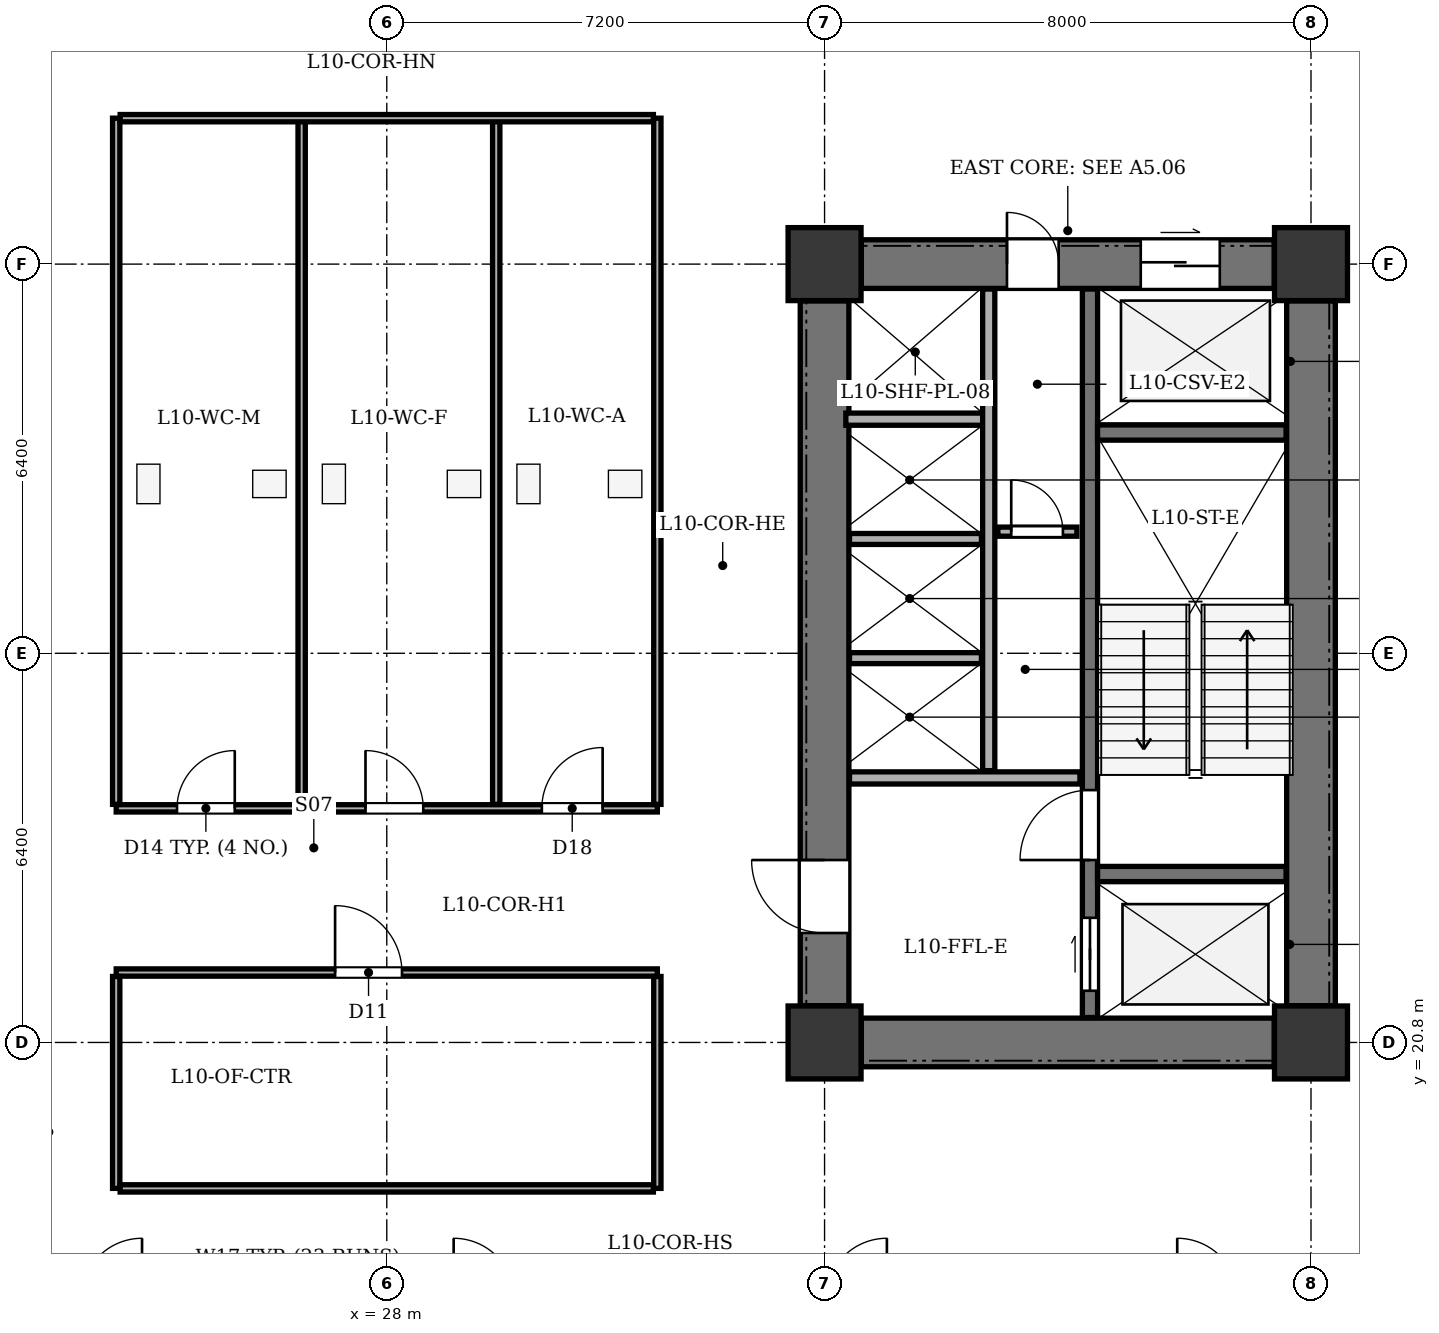
"""IFC4 building model, lengths in metres.
Left out: names, types, materials, properties, quantities, classifications, styles, units other than length and angle.
Written with IfcOpenShell. Run it as: python <this file> out.ifc"""

import sys

from ifc_helpers import new_model, si_unit, direction, frame, frame_2d, origin, origin_2d, place, context, subcontext, project, spatial, rectangle, extrude, element, fill, save


model = new_model("IFC4")
c1 = context("Model", 3, precision=1e-05, world=origin(), true_north=direction((0.0, 1.0)))
c2 = subcontext(c1, "Body", "Model", "MODEL_VIEW")
j1 = project(units=[si_unit("LENGTHUNIT", "METRE"), si_unit("PLANEANGLEUNIT", "RADIAN")], contexts=[c1])
p1 = place(None, origin())
s1 = spatial("IfcSite", under=j1, at=p1, CompositionType="ELEMENT")
p2 = place(p1, origin())
s2 = spatial("IfcBuilding", under=s1, at=p2, CompositionType="ELEMENT")
p3 = place(p2, frame((0.0, 0.0, 43.8)))
s3 = spatial("IfcBuildingStorey", under=s2, at=p3, CompositionType="ELEMENT", Elevation=43.8)
for number, where, z_axis, x_axis in (
    (1, (35.2, 20.8, 0.0), (0.0, 0.0, 1.0), (1.0, 0.0, 0.0)),
    (2, (43.2, 20.8, 0.0), (0.0, 0.0, 1.0), (1.0, 0.0, 0.0)),
    (3, (35.2, 33.6, 0.0), (0.0, 0.0, 1.0), (1.0, 0.0, 0.0)),
    (4, (43.2, 33.6, 0.0), (0.0, 0.0, 1.0), (1.0, 0.0, 0.0)),
):
    element("IfcColumn", number, at=place(p3, frame(where, z_axis=z_axis, x_axis=x_axis)), inside=s3, PredefinedType="COLUMN", context=c2, shape_type="SweptSolid", body=[
        extrude(rectangle(XDim=1.2, YDim=1.2, at=origin_2d()), origin(), (0.0, 0.0, 1.0), 3.9),
    ])
p4 = place(p3, frame((43.2, 21.405, 0.0), z_axis=(0.0, 0.0, 1.0), x_axis=(0.0, 1.0, 0.0)))
e5 = element("IfcWall", 5, at=p4, inside=s3, PredefinedType="SHEAR", context=c2, shape_type="SweptSolid", body=[
    extrude(rectangle(XDim=11.59, YDim=0.8, at=frame_2d((5.795, 0.0))), origin(), (0.0, 0.0, 1.0), 3.45),
])
p5 = place(p3, frame((35.805, 20.8, 0.0), z_axis=(0.0, 0.0, 1.0), x_axis=(1.0, 0.0, 0.0)))
e6 = element("IfcWall", 6, at=p5, inside=s3, PredefinedType="SHEAR", context=c2, shape_type="SweptSolid", body=[
    extrude(rectangle(XDim=6.79, YDim=0.8, at=frame_2d((3.395, 0.0))), origin(), (0.0, 0.0, 1.0), 3.45),
])
p6 = place(p3, frame((35.805, 33.6, 0.0), z_axis=(0.0, 0.0, 1.0), x_axis=(1.0, 0.0, 0.0)))
e7 = element("IfcWall", 7, at=p6, inside=s3, PredefinedType="SHEAR", context=c2, shape_type="SweptSolid", body=[
    extrude(rectangle(XDim=6.79, YDim=0.8, at=frame_2d((3.395, 0.0))), origin(), (0.0, 0.0, 1.0), 3.45),
])
p7 = place(p6, frame((4.595, 0.0, 0.0)))
e8 = element("IfcOpeningElement", 8, at=p7, cuts=e7, PredefinedType="OPENING", context=c2, shape_type="SweptSolid", body=[
    extrude(rectangle(XDim=1.3, YDim=2.15, at=frame_2d((0.65, 1.075))), frame((0.0, 0.41, 0.0), z_axis=(0.0, -1.0, 0.0), x_axis=(1.0, 0.0, 0.0)), (0.0, 0.0, 1.0), 0.82),
])
p8 = place(p6, frame((2.395, 0.0, 0.0)))
e9 = element("IfcOpeningElement", 9, at=p8, cuts=e7, PredefinedType="OPENING", context=c2, shape_type="SweptSolid", body=[
    extrude(rectangle(XDim=0.85, YDim=2.02, at=frame_2d((0.425, 1.01))), frame((0.0, 0.41, 0.0), z_axis=(0.0, -1.0, 0.0), x_axis=(1.0, 0.0, 0.0)), (0.0, 0.0, 1.0), 0.82),
])
p9 = place(p3, frame((35.2, 21.405, 0.0), z_axis=(0.0, 0.0, 1.0), x_axis=(0.0, 1.0, 0.0)))
e10 = element("IfcWall", 10, at=p9, inside=s3, PredefinedType="SHEAR", context=c2, shape_type="SweptSolid", body=[
    extrude(rectangle(XDim=11.59, YDim=0.8, at=frame_2d((5.795, 0.0))), origin(), (0.0, 0.0, 1.0), 3.45),
])
p10 = place(p9, frame((1.195, 0.0, 0.0)))
e11 = element("IfcOpeningElement", 11, at=p10, cuts=e10, PredefinedType="OPENING", context=c2, shape_type="SweptSolid", body=[
    extrude(rectangle(XDim=1.2, YDim=2.15, at=frame_2d((0.6, 1.075))), frame((0.0, 0.41, 0.0), z_axis=(0.0, -1.0, 0.0), x_axis=(1.0, 0.0, 0.0)), (0.0, 0.0, 1.0), 0.82),
])
p11 = place(p3, frame((39.565, 21.21, 0.0), z_axis=(0.0, 0.0, 1.0), x_axis=(0.0, 1.0, 0.0)))
e12 = element("IfcWall", 12, at=p11, inside=s3, PredefinedType="SHEAR", context=c2, shape_type="SweptSolid", body=[
    extrude(rectangle(XDim=11.98, YDim=0.25, at=frame_2d((5.99, 0.0))), origin(), (0.0, 0.0, 1.0), 3.45),
])
p12 = place(p11, frame((0.44, 0.0, 0.0)))
e13 = element("IfcOpeningElement", 13, at=p12, cuts=e12, PredefinedType="OPENING", context=c2, shape_type="SweptSolid", body=[
    extrude(rectangle(XDim=1.2, YDim=2.15, at=frame_2d((0.6, 1.075))), frame((0.0, 0.135, 0.0), z_axis=(0.0, -1.0, 0.0), x_axis=(1.0, 0.0, 0.0)), (0.0, 0.0, 1.0), 0.27),
])
p13 = place(p11, frame((2.59, 0.0, 0.0)))
e14 = element("IfcOpeningElement", 14, at=p13, cuts=e12, PredefinedType="OPENING", context=c2, shape_type="SweptSolid", body=[
    extrude(rectangle(XDim=1.15, YDim=2.15, at=frame_2d((0.575, 1.075))), frame((0.0, 0.135, 0.0), z_axis=(0.0, -1.0, 0.0), x_axis=(1.0, 0.0, 0.0)), (0.0, 0.0, 1.0), 0.27),
])
for number, where, z_axis, x_axis in (
    (15, (39.69, 23.57, 0.0), (0.0, 0.0, 1.0), (1.0, 0.0, 0.0)),
    (16, (39.69, 30.83, 0.0), (0.0, 0.0, 1.0), (1.0, 0.0, 0.0)),
):
    element("IfcWall", number, at=place(p3, frame(where, z_axis=z_axis, x_axis=x_axis)), inside=s3, PredefinedType="SHEAR", context=c2, shape_type="SweptSolid", body=[
        extrude(rectangle(XDim=3.1, YDim=0.25, at=frame_2d((1.55, 0.0))), origin(), (0.0, 0.0, 1.0), 3.45),
    ])
p14 = place(p3, frame((35.61, 25.15, 0.0), z_axis=(0.0, 0.0, 1.0), x_axis=(1.0, 0.0, 0.0)))
e17 = element("IfcWall", 17, at=p14, inside=s3, PredefinedType="SOLIDWALL", context=c2, shape_type="SweptSolid", body=[
    extrude(rectangle(XDim=3.79, YDim=0.2, at=frame_2d((1.895, 0.0))), origin(), (0.0, 0.0, 1.0), 3.45),
])
p15 = place(p3, frame((35.55, 31.05, 0.0), z_axis=(0.0, 0.0, 1.0), x_axis=(1.0, 0.0, 0.0)))
e18 = element("IfcWall", 18, at=p15, inside=s3, PredefinedType="SOLIDWALL", context=c2, shape_type="SweptSolid", body=[
    extrude(rectangle(XDim=2.25, YDim=0.2, at=frame_2d((1.125, 0.0))), origin(), (0.0, 0.0, 1.0), 3.45),
])
p16 = place(p3, frame((37.9, 25.27, 0.0), z_axis=(0.0, 0.0, 1.0), x_axis=(0.0, 1.0, 0.0)))
e19 = element("IfcWall", 19, at=p16, inside=s3, PredefinedType="SOLIDWALL", context=c2, shape_type="SweptSolid", body=[
    extrude(rectangle(XDim=7.92, YDim=0.2, at=frame_2d((3.96, 0.0))), origin(), (0.0, 0.0, 1.0), 3.45),
])
for number, where, z_axis, x_axis in (
    (20, (35.61, 27.12, 0.0), (0.0, 0.0, 1.0), (1.0, 0.0, 0.0)),
    (21, (35.61, 29.08, 0.0), (0.0, 0.0, 1.0), (1.0, 0.0, 0.0)),
):
    element("IfcWall", number, at=place(p3, frame(where, z_axis=z_axis, x_axis=x_axis)), inside=s3, PredefinedType="PARTITIONING", context=c2, shape_type="SweptSolid", body=[
        extrude(rectangle(XDim=2.17, YDim=0.18, at=frame_2d((1.085, 0.0))), origin(), (0.0, 0.0, 1.0), 3.45),
    ])
p17 = place(p3, frame((38.05, 29.2, 0.0), z_axis=(0.0, 0.0, 1.0), x_axis=(1.0, 0.0, 0.0)))
e22 = element("IfcWall", 22, at=p17, inside=s3, PredefinedType="PARTITIONING", context=c2, shape_type="SweptSolid", body=[
    extrude(rectangle(XDim=1.3, YDim=0.15, at=frame_2d((0.65, 0.0))), origin(), (0.0, 0.0, 1.0), 3.45),
])
p18 = place(p17, frame((0.22, 0.0, 0.0)))
e23 = element("IfcOpeningElement", 23, at=p18, cuts=e22, PredefinedType="OPENING", context=c2, shape_type="SweptSolid", body=[
    extrude(rectangle(XDim=0.85, YDim=2.02, at=frame_2d((0.425, 1.01))), frame((0.0, 0.085, 0.0), z_axis=(0.0, -1.0, 0.0), x_axis=(1.0, 0.0, 0.0)), (0.0, 0.0, 1.0), 0.17),
])
p19 = place(p3, frame((23.55, 24.65, 0.0), z_axis=(0.0, 0.0, 1.0), x_axis=(1.0, 0.0, 0.0)))
e24 = element("IfcWall", 24, at=p19, inside=s3, PredefinedType="PARTITIONING", context=c2, shape_type="SweptSolid", body=[
    extrude(rectangle(XDim=8.9, YDim=0.12, at=frame_2d((4.45, 0.0))), origin(), (0.0, 0.0, 1.0), 2.885),
])
p20 = place(p19, frame((1.0, 0.0, 0.0)))
e25 = element("IfcOpeningElement", 25, at=p20, cuts=e24, PredefinedType="OPENING", context=c2, shape_type="SweptSolid", body=[
    extrude(rectangle(XDim=0.95, YDim=2.1, at=frame_2d((0.475, 1.05))), frame((0.0, 0.07, 0.0), z_axis=(0.0, -1.0, 0.0), x_axis=(1.0, 0.0, 0.0)), (0.0, 0.0, 1.0), 0.14),
])
p21 = place(p19, frame((4.1, 0.0, 0.0)))
e26 = element("IfcOpeningElement", 26, at=p21, cuts=e24, PredefinedType="OPENING", context=c2, shape_type="SweptSolid", body=[
    extrude(rectangle(XDim=0.95, YDim=2.1, at=frame_2d((0.475, 1.05))), frame((0.0, 0.07, 0.0), z_axis=(0.0, -1.0, 0.0), x_axis=(1.0, 0.0, 0.0)), (0.0, 0.0, 1.0), 0.14),
])
p22 = place(p19, frame((7.0, 0.0, 0.0)))
e27 = element("IfcOpeningElement", 27, at=p22, cuts=e24, PredefinedType="OPENING", context=c2, shape_type="SweptSolid", body=[
    extrude(rectangle(XDim=1.0, YDim=2.1, at=frame_2d((0.5, 1.05))), frame((0.0, 0.07, 0.0), z_axis=(0.0, -1.0, 0.0), x_axis=(1.0, 0.0, 0.0)), (0.0, 0.0, 1.0), 0.14),
])
for number, where, z_axis, x_axis in (
    (28, (23.55, 24.715, 0.0), (0.0, 0.0, 1.0), (0.0, 1.0, 0.0)),
    (29, (32.45, 24.715, 0.0), (0.0, 0.0, 1.0), (0.0, 1.0, 0.0)),
    (30, (26.6, 24.715, 0.0), (0.0, 0.0, 1.0), (0.0, 1.0, 0.0)),
):
    element("IfcWall", number, at=place(p3, frame(where, z_axis=z_axis, x_axis=x_axis)), inside=s3, PredefinedType="PARTITIONING", context=c2, shape_type="SweptSolid", body=[
        extrude(rectangle(XDim=11.285, YDim=0.12, at=frame_2d((5.643, 0.0))), origin(), (0.0, 0.0, 1.0), 3.45),
    ])
p23 = place(p3, frame((29.8, 24.715, 0.0), z_axis=(0.0, 0.0, 1.0), x_axis=(0.0, 1.0, 0.0)))
e31 = element("IfcWall", 31, at=p23, inside=s3, PredefinedType="PARTITIONING", context=c2, shape_type="SweptSolid", body=[
    extrude(rectangle(XDim=11.285, YDim=0.12, at=frame_2d((5.643, 0.0))), origin(), (0.0, 0.0, 1.0), 2.885),
])
p24 = place(p3, frame((23.615, 36.0, 0.0), z_axis=(0.0, 0.0, 1.0), x_axis=(1.0, 0.0, 0.0)))
e32 = element("IfcWall", 32, at=p24, inside=s3, PredefinedType="PARTITIONING", context=c2, shape_type="SweptSolid", body=[
    extrude(rectangle(XDim=8.77, YDim=0.12, at=frame_2d((4.385, 0.0))), origin(), (0.0, 0.0, 1.0), 3.45),
])
p25 = place(p3, frame((23.55, 21.95, 0.0), z_axis=(0.0, 0.0, 1.0), x_axis=(1.0, 0.0, 0.0)))
e33 = element("IfcWall", 33, at=p25, inside=s3, PredefinedType="PARTITIONING", context=c2, shape_type="SweptSolid", body=[
    extrude(rectangle(XDim=8.9, YDim=0.12, at=frame_2d((4.45, 0.0))), origin(), (0.0, 0.0, 1.0), 2.885),
])
p26 = place(p25, frame((3.6, 0.0, 0.0)))
e34 = element("IfcOpeningElement", 34, at=p26, cuts=e33, PredefinedType="OPENING", context=c2, shape_type="SweptSolid", body=[
    extrude(rectangle(XDim=1.1, YDim=2.15, at=frame_2d((0.55, 1.075))), frame((0.0, 0.07, 0.0), z_axis=(0.0, -1.0, 0.0), x_axis=(1.0, 0.0, 0.0)), (0.0, 0.0, 1.0), 0.14),
])
for number, where, z_axis, x_axis in (
    (35, (23.55, 18.4, 0.0), (0.0, 0.0, 1.0), (0.0, 1.0, 0.0)),
    (36, (32.45, 18.4, 0.0), (0.0, 0.0, 1.0), (0.0, 1.0, 0.0)),
):
    element("IfcWall", number, at=place(p3, frame(where, z_axis=z_axis, x_axis=x_axis)), inside=s3, PredefinedType="PARTITIONING", context=c2, shape_type="SweptSolid", body=[
        extrude(rectangle(XDim=3.485, YDim=0.12, at=frame_2d((1.743, 0.0))), origin(), (0.0, 0.0, 1.0), 3.45),
    ])
p27 = place(p3, frame((23.615, 18.4, 0.0), z_axis=(0.0, 0.0, 1.0), x_axis=(1.0, 0.0, 0.0)))
e37 = element("IfcWall", 37, at=p27, inside=s3, PredefinedType="PARTITIONING", context=c2, shape_type="SweptSolid", body=[
    extrude(rectangle(XDim=8.77, YDim=0.12, at=frame_2d((4.385, 0.0))), origin(), (0.0, 0.0, 1.0), 3.45),
])
p28 = place(p7, origin())
e38 = element("IfcDoor", 38, at=p28, inside=s3, OperationType="DOUBLE_DOOR_SLIDING", PredefinedType="DOOR", context=c2, shape_type="SweptSolid", body=[
    extrude(rectangle(XDim=1.3, YDim=2.15, at=frame_2d((0.65, 1.075))), frame((0.0, 0.025, 0.0), z_axis=(0.0, -1.0, 0.0), x_axis=(1.0, 0.0, 0.0)), (0.0, 0.0, 1.0), 0.05),
])
fill(e8, e38)
p29 = place(p8, origin())
e39 = element("IfcDoor", 39, at=p29, inside=s3, OperationType="SINGLE_SWING_LEFT", PredefinedType="DOOR", context=c2, shape_type="SweptSolid", body=[
    extrude(rectangle(XDim=0.85, YDim=2.02, at=frame_2d((0.425, 1.01))), frame((0.0, 0.025, 0.0), z_axis=(0.0, -1.0, 0.0), x_axis=(1.0, 0.0, 0.0)), (0.0, 0.0, 1.0), 0.05),
])
fill(e9, e39)
p30 = place(p10, origin())
e40 = element("IfcDoor", 40, at=p30, inside=s3, OperationType="SINGLE_SWING_RIGHT", PredefinedType="DOOR", context=c2, shape_type="SweptSolid", body=[
    extrude(rectangle(XDim=1.2, YDim=2.15, at=frame_2d((0.6, 1.075))), frame((0.0, 0.025, 0.0), z_axis=(0.0, -1.0, 0.0), x_axis=(1.0, 0.0, 0.0)), (0.0, 0.0, 1.0), 0.05),
])
fill(e11, e40)
p31 = place(p12, origin())
e41 = element("IfcDoor", 41, at=p31, inside=s3, OperationType="DOUBLE_DOOR_SLIDING", PredefinedType="DOOR", context=c2, shape_type="SweptSolid", body=[
    extrude(rectangle(XDim=1.2, YDim=2.15, at=frame_2d((0.6, 1.075))), frame((0.0, 0.025, 0.0), z_axis=(0.0, -1.0, 0.0), x_axis=(1.0, 0.0, 0.0)), (0.0, 0.0, 1.0), 0.05),
])
fill(e13, e41)
p32 = place(p13, origin())
e42 = element("IfcDoor", 42, at=p32, inside=s3, OperationType="SINGLE_SWING_LEFT", PredefinedType="DOOR", context=c2, shape_type="SweptSolid", body=[
    extrude(rectangle(XDim=1.15, YDim=2.15, at=frame_2d((0.575, 1.075))), frame((0.0, 0.025, 0.0), z_axis=(0.0, -1.0, 0.0), x_axis=(1.0, 0.0, 0.0)), (0.0, 0.0, 1.0), 0.05),
])
fill(e14, e42)
p33 = place(p18, origin())
e43 = element("IfcDoor", 43, at=p33, inside=s3, OperationType="SINGLE_SWING_LEFT", PredefinedType="DOOR", context=c2, shape_type="SweptSolid", body=[
    extrude(rectangle(XDim=0.85, YDim=2.02, at=frame_2d((0.425, 1.01))), frame((0.0, 0.025, 0.0), z_axis=(0.0, -1.0, 0.0), x_axis=(1.0, 0.0, 0.0)), (0.0, 0.0, 1.0), 0.05),
])
fill(e23, e43)
p34 = place(p20, origin())
e44 = element("IfcDoor", 44, at=p34, inside=s3, OperationType="SINGLE_SWING_RIGHT", PredefinedType="DOOR", context=c2, shape_type="SweptSolid", body=[
    extrude(rectangle(XDim=0.95, YDim=2.1, at=frame_2d((0.475, 1.05))), frame((0.0, 0.025, 0.0), z_axis=(0.0, -1.0, 0.0), x_axis=(1.0, 0.0, 0.0)), (0.0, 0.0, 1.0), 0.05),
])
fill(e25, e44)
p35 = place(p21, origin())
e45 = element("IfcDoor", 45, at=p35, inside=s3, OperationType="SINGLE_SWING_LEFT", PredefinedType="DOOR", context=c2, shape_type="SweptSolid", body=[
    extrude(rectangle(XDim=0.95, YDim=2.1, at=frame_2d((0.475, 1.05))), frame((0.0, 0.025, 0.0), z_axis=(0.0, -1.0, 0.0), x_axis=(1.0, 0.0, 0.0)), (0.0, 0.0, 1.0), 0.05),
])
fill(e26, e45)
p36 = place(p22, origin())
e46 = element("IfcDoor", 46, at=p36, inside=s3, OperationType="SINGLE_SWING_RIGHT", PredefinedType="DOOR", context=c2, shape_type="SweptSolid", body=[
    extrude(rectangle(XDim=1.0, YDim=2.1, at=frame_2d((0.5, 1.05))), frame((0.0, 0.025, 0.0), z_axis=(0.0, -1.0, 0.0), x_axis=(1.0, 0.0, 0.0)), (0.0, 0.0, 1.0), 0.05),
])
fill(e27, e46)
p37 = place(p26, origin())
e47 = element("IfcDoor", 47, at=p37, inside=s3, OperationType="SINGLE_SWING_LEFT", PredefinedType="DOOR", context=c2, shape_type="SweptSolid", body=[
    extrude(rectangle(XDim=1.1, YDim=2.15, at=frame_2d((0.55, 1.075))), frame((0.0, 0.025, 0.0), z_axis=(0.0, -1.0, 0.0), x_axis=(1.0, 0.0, 0.0)), (0.0, 0.0, 1.0), 0.05),
])
fill(e34, e47)
save(model, sys.argv[1])
